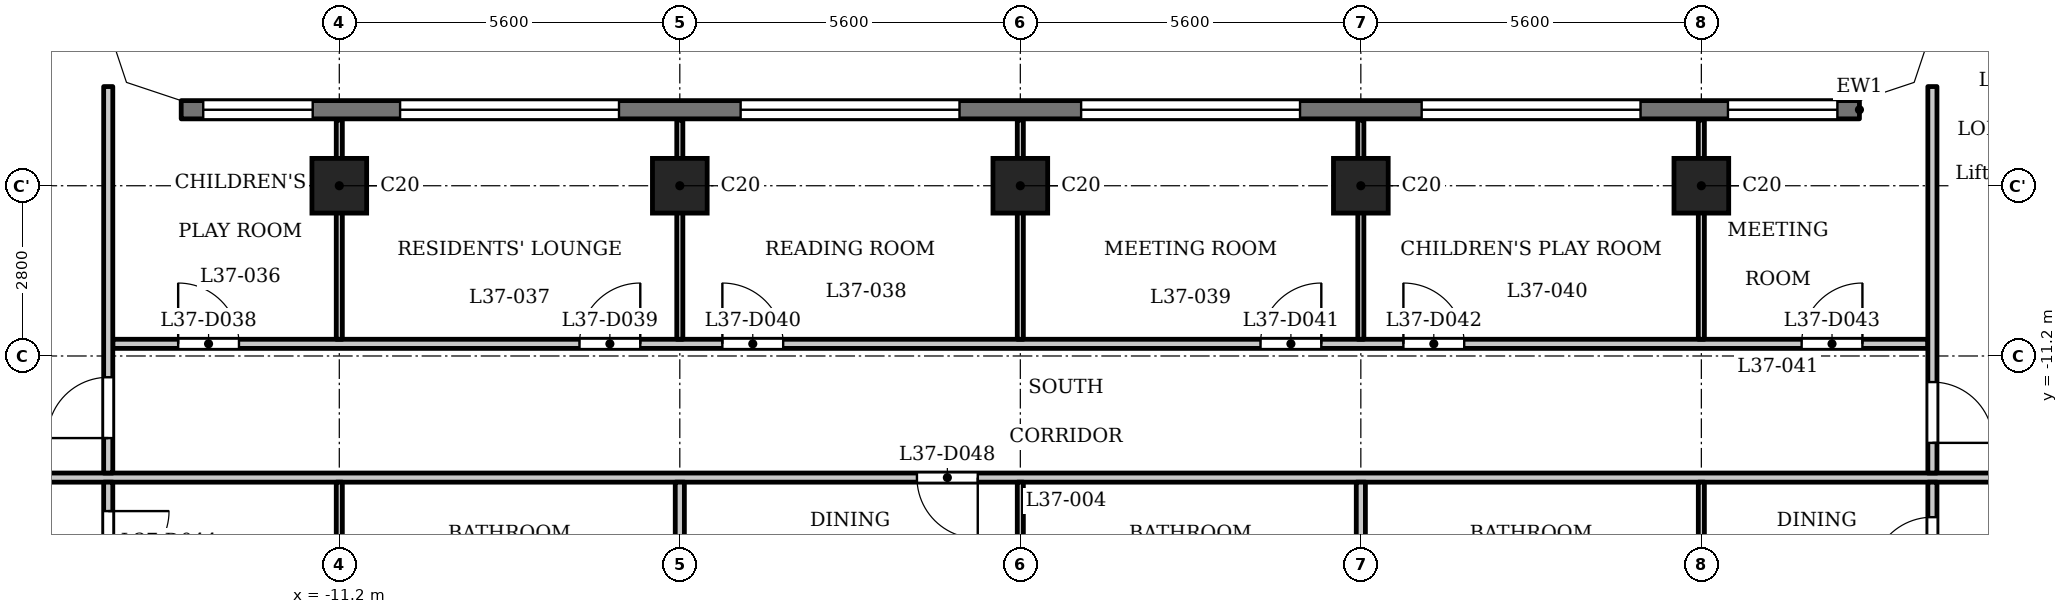
"""IFC4 building model, lengths in metres.
Left out: names, types, materials, properties, quantities, classifications, styles, units other than length and angle.
Written with IfcOpenShell. Run it as: python <this file> out.ifc"""

import sys

from ifc_helpers import new_model, si_unit, direction, frame, frame_2d, origin, origin_2d, place, context, subcontext, project, spatial, polyline, rectangle, outline, extrude, element, fill, save


model = new_model("IFC4")
c1 = context("Model", 3, precision=1e-05, world=origin(), true_north=direction((0.0, 1.0)))
c2 = subcontext(c1, "Body", "Model", "MODEL_VIEW")
j1 = project(units=[si_unit("LENGTHUNIT", "METRE"), si_unit("PLANEANGLEUNIT", "RADIAN")], contexts=[c1])
p1 = place(None, origin())
s1 = spatial("IfcSite", under=j1, at=p1, CompositionType="ELEMENT")
p2 = place(p1, origin())
s2 = spatial("IfcBuilding", under=s1, at=p2, CompositionType="ELEMENT")
p3 = place(p2, frame((0.0, 0.0, 146.6)))
s3 = spatial("IfcBuildingStorey", under=s2, at=p3, CompositionType="ELEMENT", Elevation=146.6)
for number, where, z_axis, x_axis in (
    (1, (-11.2, -8.4, 0.0), (0.0, 0.0, 1.0), (1.0, 0.0, 0.0)),
    (2, (-5.6, -8.4, 0.0), (0.0, 0.0, 1.0), (1.0, 0.0, 0.0)),
    (3, (0.0, -8.4, 0.0), (0.0, 0.0, 1.0), (1.0, 0.0, 0.0)),
    (4, (5.6, -8.4, 0.0), (0.0, 0.0, 1.0), (1.0, 0.0, 0.0)),
    (5, (11.2, -8.4, 0.0), (0.0, 0.0, 1.0), (1.0, 0.0, 0.0)),
):
    element("IfcColumn", number, at=place(p3, frame(where, z_axis=z_axis, x_axis=x_axis)), inside=s3, PredefinedType="COLUMN", context=c2, shape_type="SweptSolid", body=[
        extrude(rectangle(XDim=0.9, YDim=0.9, at=origin_2d()), origin(), (0.0, 0.0, 1.0), 3.5),
    ])
p4 = place(p3, frame((13.8, -7.15, 0.0), z_axis=(0.0, 0.0, 1.0), x_axis=(-1.0, 0.0, 0.0)))
e6 = element("IfcWall", 6, at=p4, inside=s3, PredefinedType="SOLIDWALL", context=c2, shape_type="SweptSolid", body=[
    extrude(rectangle(XDim=27.6, YDim=0.3, at=frame_2d((13.8, 0.0))), origin(), (0.0, 0.0, 1.0), 3.2),
])
p5 = place(p4, frame((0.363, 0.0, 0.9)))
e7 = element("IfcOpeningElement", 7, at=p5, cuts=e6, PredefinedType="OPENING", context=c2, shape_type="SweptSolid", body=[
    extrude(rectangle(XDim=1.8, YDim=1.25, at=frame_2d((0.9, 0.625))), frame((0.0, 0.16, 0.0), z_axis=(0.0, -1.0, 0.0), x_axis=(1.0, 0.0, 0.0)), (0.0, 0.0, 1.0), 0.32),
])
p6 = place(p4, frame((3.6, 0.0, 1.2)))
e8 = element("IfcOpeningElement", 8, at=p6, cuts=e6, PredefinedType="OPENING", context=c2, shape_type="SweptSolid", body=[
    extrude(rectangle(XDim=3.6, YDim=0.95, at=frame_2d((1.8, 0.475))), frame((0.0, 0.16, 0.0), z_axis=(0.0, -1.0, 0.0), x_axis=(1.0, 0.0, 0.0)), (0.0, 0.0, 1.0), 0.32),
])
p7 = place(p4, frame((9.2, 0.0, 1.2)))
e9 = element("IfcOpeningElement", 9, at=p7, cuts=e6, PredefinedType="OPENING", context=c2, shape_type="SweptSolid", body=[
    extrude(rectangle(XDim=3.6, YDim=0.95, at=frame_2d((1.8, 0.475))), frame((0.0, 0.16, 0.0), z_axis=(0.0, -1.0, 0.0), x_axis=(1.0, 0.0, 0.0)), (0.0, 0.0, 1.0), 0.32),
])
p8 = place(p4, frame((14.8, 0.0, 1.2)))
e10 = element("IfcOpeningElement", 10, at=p8, cuts=e6, PredefinedType="OPENING", context=c2, shape_type="SweptSolid", body=[
    extrude(rectangle(XDim=3.6, YDim=0.95, at=frame_2d((1.8, 0.475))), frame((0.0, 0.16, 0.0), z_axis=(0.0, -1.0, 0.0), x_axis=(1.0, 0.0, 0.0)), (0.0, 0.0, 1.0), 0.32),
])
p9 = place(p4, frame((20.4, 0.0, 1.2)))
e11 = element("IfcOpeningElement", 11, at=p9, cuts=e6, PredefinedType="OPENING", context=c2, shape_type="SweptSolid", body=[
    extrude(rectangle(XDim=3.6, YDim=0.95, at=frame_2d((1.8, 0.475))), frame((0.0, 0.16, 0.0), z_axis=(0.0, -1.0, 0.0), x_axis=(1.0, 0.0, 0.0)), (0.0, 0.0, 1.0), 0.32),
])
p10 = place(p4, frame((25.438, 0.0, 0.9)))
e12 = element("IfcOpeningElement", 12, at=p10, cuts=e6, PredefinedType="OPENING", context=c2, shape_type="SweptSolid", body=[
    extrude(rectangle(XDim=1.8, YDim=1.25, at=frame_2d((0.9, 0.625))), frame((0.0, 0.16, 0.0), z_axis=(0.0, -1.0, 0.0), x_axis=(1.0, 0.0, 0.0)), (0.0, 0.0, 1.0), 0.32),
])
p11 = place(p3, frame((-17.4, -13.2, 0.0), z_axis=(0.0, 0.0, 1.0), x_axis=(1.0, 0.0, 0.0)))
e13 = element("IfcWall", 13, at=p11, inside=s3, PredefinedType="PARTITIONING", context=c2, shape_type="SweptSolid", body=[
    extrude(rectangle(XDim=34.8, YDim=0.15, at=frame_2d((17.4, 0.0))), origin(), (0.0, 0.0, 1.0), 3.2),
])
p12 = place(p11, frame((0.15, 0.0, 0.0)))
e14 = element("IfcOpeningElement", 14, at=p12, cuts=e13, PredefinedType="OPENING", context=c2, shape_type="SweptSolid", body=[
    extrude(rectangle(XDim=1.0, YDim=2.1, at=frame_2d((0.5, 1.05))), frame((0.0, 0.085, 0.0), z_axis=(0.0, -1.0, 0.0), x_axis=(1.0, 0.0, 0.0)), (0.0, 0.0, 1.0), 0.17),
])
p13 = place(p11, frame((33.55, 0.0, 0.0)))
e15 = element("IfcOpeningElement", 15, at=p13, cuts=e13, PredefinedType="OPENING", context=c2, shape_type="SweptSolid", body=[
    extrude(rectangle(XDim=1.0, YDim=2.1, at=frame_2d((0.5, 1.05))), frame((0.0, 0.085, 0.0), z_axis=(0.0, -1.0, 0.0), x_axis=(1.0, 0.0, 0.0)), (0.0, 0.0, 1.0), 0.17),
])
p14 = place(p11, frame((15.7, 0.0, 0.0)))
e16 = element("IfcOpeningElement", 16, at=p14, cuts=e13, PredefinedType="OPENING", context=c2, shape_type="SweptSolid", body=[
    extrude(rectangle(XDim=1.0, YDim=2.1, at=frame_2d((0.5, 1.05))), frame((0.0, 0.085, 0.0), z_axis=(0.0, -1.0, 0.0), x_axis=(1.0, 0.0, 0.0)), (0.0, 0.0, 1.0), 0.17),
])
p15 = place(p3, frame((-14.925, -11.0, 0.0), z_axis=(0.0, 0.0, 1.0), x_axis=(1.0, 0.0, 0.0)))
e17 = element("IfcWall", 17, at=p15, inside=s3, PredefinedType="PARTITIONING", context=c2, shape_type="SweptSolid", body=[
    extrude(rectangle(XDim=29.85, YDim=0.15, at=frame_2d((14.925, 0.0))), origin(), (0.0, 0.0, 1.0), 3.2),
])
p16 = place(p15, frame((1.075, 0.0, 0.0)))
e18 = element("IfcOpeningElement", 18, at=p16, cuts=e17, PredefinedType="OPENING", context=c2, shape_type="SweptSolid", body=[
    extrude(rectangle(XDim=1.0, YDim=2.1, at=frame_2d((0.5, 1.05))), frame((0.0, 0.085, 0.0), z_axis=(0.0, -1.0, 0.0), x_axis=(1.0, 0.0, 0.0)), (0.0, 0.0, 1.0), 0.17),
])
p17 = place(p15, frame((7.675, 0.0, 0.0)))
e19 = element("IfcOpeningElement", 19, at=p17, cuts=e17, PredefinedType="OPENING", context=c2, shape_type="SweptSolid", body=[
    extrude(rectangle(XDim=1.0, YDim=2.1, at=frame_2d((0.5, 1.05))), frame((0.0, 0.085, 0.0), z_axis=(0.0, -1.0, 0.0), x_axis=(1.0, 0.0, 0.0)), (0.0, 0.0, 1.0), 0.17),
])
p18 = place(p15, frame((10.025, 0.0, 0.0)))
e20 = element("IfcOpeningElement", 20, at=p18, cuts=e17, PredefinedType="OPENING", context=c2, shape_type="SweptSolid", body=[
    extrude(rectangle(XDim=1.0, YDim=2.1, at=frame_2d((0.5, 1.05))), frame((0.0, 0.085, 0.0), z_axis=(0.0, -1.0, 0.0), x_axis=(1.0, 0.0, 0.0)), (0.0, 0.0, 1.0), 0.17),
])
p19 = place(p15, frame((18.875, 0.0, 0.0)))
e21 = element("IfcOpeningElement", 21, at=p19, cuts=e17, PredefinedType="OPENING", context=c2, shape_type="SweptSolid", body=[
    extrude(rectangle(XDim=1.0, YDim=2.1, at=frame_2d((0.5, 1.05))), frame((0.0, 0.085, 0.0), z_axis=(0.0, -1.0, 0.0), x_axis=(1.0, 0.0, 0.0)), (0.0, 0.0, 1.0), 0.17),
])
p20 = place(p15, frame((21.225, 0.0, 0.0)))
e22 = element("IfcOpeningElement", 22, at=p20, cuts=e17, PredefinedType="OPENING", context=c2, shape_type="SweptSolid", body=[
    extrude(rectangle(XDim=1.0, YDim=2.1, at=frame_2d((0.5, 1.05))), frame((0.0, 0.085, 0.0), z_axis=(0.0, -1.0, 0.0), x_axis=(1.0, 0.0, 0.0)), (0.0, 0.0, 1.0), 0.17),
])
p21 = place(p15, frame((27.774, 0.0, 0.0)))
e23 = element("IfcOpeningElement", 23, at=p21, cuts=e17, PredefinedType="OPENING", context=c2, shape_type="SweptSolid", body=[
    extrude(rectangle(XDim=1.0, YDim=2.1, at=frame_2d((0.5, 1.05))), frame((0.0, 0.085, 0.0), z_axis=(0.0, -1.0, 0.0), x_axis=(1.0, 0.0, 0.0)), (0.0, 0.0, 1.0), 0.17),
])
p22 = place(p3, frame((-15.0, -15.325, 0.0), z_axis=(0.0, 0.0, 1.0), x_axis=(0.0, 1.0, 0.0)))
e24 = element("IfcWall", 24, at=p22, inside=s3, PredefinedType="PARTITIONING", context=c2, shape_type="SweptSolid", body=[
    extrude(rectangle(XDim=2.05, YDim=0.15, at=frame_2d((1.025, 0.0))), origin(), (0.0, 0.0, 1.0), 3.2),
])
p23 = place(p22, frame((0.574, 0.0, 0.0)))
e25 = element("IfcOpeningElement", 25, at=p23, cuts=e24, PredefinedType="OPENING", context=c2, shape_type="SweptSolid", body=[
    extrude(rectangle(XDim=1.0, YDim=2.1, at=frame_2d((0.5, 1.05))), frame((0.0, 0.085, 0.0), z_axis=(0.0, -1.0, 0.0), x_axis=(1.0, 0.0, 0.0)), (0.0, 0.0, 1.0), 0.17),
])
p24 = place(p3, frame((-15.0, -13.125, 0.0), z_axis=(0.0, 0.0, 1.0), x_axis=(0.0, 1.0, 0.0)))
e26 = element("IfcWall", 26, at=p24, inside=s3, PredefinedType="PARTITIONING", context=c2, shape_type="SweptSolid", body=[
    extrude(rectangle(XDim=6.356, YDim=0.15, at=frame_2d((3.178, 0.0))), origin(), (0.0, 0.0, 1.0), 3.2),
])
p25 = place(p24, frame((0.575, 0.0, 0.0)))
e27 = element("IfcOpeningElement", 27, at=p25, cuts=e26, PredefinedType="OPENING", context=c2, shape_type="SweptSolid", body=[
    extrude(rectangle(XDim=1.0, YDim=2.1, at=frame_2d((0.5, 1.05))), frame((0.0, 0.085, 0.0), z_axis=(0.0, -1.0, 0.0), x_axis=(1.0, 0.0, 0.0)), (0.0, 0.0, 1.0), 0.17),
])
p26 = place(p3, frame((-11.2, -16.45, 0.0), z_axis=(0.0, 0.0, 1.0), x_axis=(0.0, 1.0, 0.0)))
e28 = element("IfcWall", 28, at=p26, inside=s3, PredefinedType="PARTITIONING", context=c2, shape_type="SweptSolid", body=[
    extrude(rectangle(XDim=3.175, YDim=0.1, at=frame_2d((1.587, 0.0))), origin(), (0.0, 0.0, 1.0), 3.2),
])
for number, where, z_axis, x_axis in (
    (29, (-11.2, -10.925, 0.0), (0.0, 0.0, 1.0), (0.0, 1.0, 0.0)),
    (30, (-5.6, -10.925, 0.0), (0.0, 0.0, 1.0), (0.0, 1.0, 0.0)),
):
    element("IfcWall", number, at=place(p3, frame(where, z_axis=z_axis, x_axis=x_axis)), inside=s3, PredefinedType="PARTITIONING", context=c2, shape_type="SweptSolid", body=[
        extrude(rectangle(XDim=3.605, YDim=0.1, at=frame_2d((1.802, 0.0))), origin(), (0.0, 0.0, 1.0), 3.2),
    ])
p27 = place(p3, frame((-5.6, -16.45, 0.0), z_axis=(0.0, 0.0, 1.0), x_axis=(0.0, 1.0, 0.0)))
e31 = element("IfcWall", 31, at=p27, inside=s3, PredefinedType="PARTITIONING", context=c2, shape_type="SweptSolid", body=[
    extrude(rectangle(XDim=3.175, YDim=0.15, at=frame_2d((1.587, 0.0))), origin(), (0.0, 0.0, 1.0), 3.2),
])
p28 = place(p3, frame((0.0, -16.45, 0.0), z_axis=(0.0, 0.0, 1.0), x_axis=(0.0, 1.0, 0.0)))
e32 = element("IfcWall", 32, at=p28, inside=s3, PredefinedType="PARTITIONING", context=c2, shape_type="SweptSolid", body=[
    extrude(rectangle(XDim=3.175, YDim=0.1, at=frame_2d((1.587, 0.0))), origin(), (0.0, 0.0, 1.0), 3.2),
])
for number, where, z_axis, x_axis in (
    (33, (0.0, -10.925, 0.0), (0.0, 0.0, 1.0), (0.0, 1.0, 0.0)),
    (34, (5.6, -10.925, 0.0), (0.0, 0.0, 1.0), (0.0, 1.0, 0.0)),
):
    element("IfcWall", number, at=place(p3, frame(where, z_axis=z_axis, x_axis=x_axis)), inside=s3, PredefinedType="PARTITIONING", context=c2, shape_type="SweptSolid", body=[
        extrude(rectangle(XDim=3.605, YDim=0.1, at=frame_2d((1.802, 0.0))), origin(), (0.0, 0.0, 1.0), 3.2),
    ])
p29 = place(p3, frame((5.6, -16.45, 0.0), z_axis=(0.0, 0.0, 1.0), x_axis=(0.0, 1.0, 0.0)))
e35 = element("IfcWall", 35, at=p29, inside=s3, PredefinedType="PARTITIONING", context=c2, shape_type="SweptSolid", body=[
    extrude(rectangle(XDim=3.175, YDim=0.15, at=frame_2d((1.587, 0.0))), origin(), (0.0, 0.0, 1.0), 3.2),
])
p30 = place(p3, frame((11.2, -16.45, 0.0), z_axis=(0.0, 0.0, 1.0), x_axis=(0.0, 1.0, 0.0)))
e36 = element("IfcWall", 36, at=p30, inside=s3, PredefinedType="PARTITIONING", context=c2, shape_type="SweptSolid", body=[
    extrude(rectangle(XDim=3.175, YDim=0.1, at=frame_2d((1.587, 0.0))), origin(), (0.0, 0.0, 1.0), 3.2),
])
p31 = place(p3, frame((11.2, -10.925, 0.0), z_axis=(0.0, 0.0, 1.0), x_axis=(0.0, 1.0, 0.0)))
e37 = element("IfcWall", 37, at=p31, inside=s3, PredefinedType="PARTITIONING", context=c2, shape_type="SweptSolid", body=[
    extrude(rectangle(XDim=3.605, YDim=0.1, at=frame_2d((1.802, 0.0))), origin(), (0.0, 0.0, 1.0), 3.2),
])
p32 = place(p3, frame((15.0, -15.325, 0.0), z_axis=(0.0, 0.0, 1.0), x_axis=(0.0, 1.0, 0.0)))
e38 = element("IfcWall", 38, at=p32, inside=s3, PredefinedType="PARTITIONING", context=c2, shape_type="SweptSolid", body=[
    extrude(rectangle(XDim=2.05, YDim=0.15, at=frame_2d((1.025, 0.0))), origin(), (0.0, 0.0, 1.0), 3.2),
])
p33 = place(p32, frame((0.474, 0.0, 0.0)))
e39 = element("IfcOpeningElement", 39, at=p33, cuts=e38, PredefinedType="OPENING", context=c2, shape_type="SweptSolid", body=[
    extrude(rectangle(XDim=1.0, YDim=2.1, at=frame_2d((0.5, 1.05))), frame((0.0, 0.085, 0.0), z_axis=(0.0, -1.0, 0.0), x_axis=(1.0, 0.0, 0.0)), (0.0, 0.0, 1.0), 0.17),
])
p34 = place(p3, frame((15.0, -13.125, 0.0), z_axis=(0.0, 0.0, 1.0), x_axis=(0.0, 1.0, 0.0)))
e40 = element("IfcWall", 40, at=p34, inside=s3, PredefinedType="PARTITIONING", context=c2, shape_type="SweptSolid", body=[
    extrude(rectangle(XDim=6.356, YDim=0.15, at=frame_2d((3.178, 0.0))), origin(), (0.0, 0.0, 1.0), 3.2),
])
p35 = place(p34, frame((0.496, 0.0, 0.0)))
e41 = element("IfcOpeningElement", 41, at=p35, cuts=e40, PredefinedType="OPENING", context=c2, shape_type="SweptSolid", body=[
    extrude(rectangle(XDim=1.0, YDim=2.1, at=frame_2d((0.5, 1.05))), frame((0.0, 0.085, 0.0), z_axis=(0.0, -1.0, 0.0), x_axis=(1.0, 0.0, 0.0)), (0.0, 0.0, 1.0), 0.17),
])
p36 = place(p3, origin())
e42 = element("IfcWall", 42, at=p36, inside=s3, PredefinedType="SOLIDWALL", context=c2, shape_type="SweptSolid", body=[
    extrude(outline(polyline([(14.937, -6.937), (15.3, -5.849), (15.3, -5.8), (15.0, -5.8), (14.7, -6.7), (13.8, -7.0), (13.8, -7.3), (13.849, -7.3), (14.937, -6.937)])), origin(), (0.0, 0.0, 1.0), 3.2),
])
e43 = element("IfcWall", 43, at=p36, inside=s3, PredefinedType="SOLIDWALL", context=c2, shape_type="SweptSolid", body=[
    extrude(outline(polyline([(-14.937, -6.937), (-13.849, -7.3), (-13.8, -7.3), (-13.8, -7.0), (-14.7, -6.7), (-15.0, -5.8), (-15.3, -5.8), (-15.3, -5.849), (-14.937, -6.937)])), origin(), (0.0, 0.0, 1.0), 3.2),
])
p37 = place(p25, origin())
e44 = element("IfcDoor", 44, at=p37, inside=s3, OperationType="SINGLE_SWING_RIGHT", PredefinedType="DOOR", context=c2, shape_type="SweptSolid", body=[
    extrude(rectangle(XDim=1.0, YDim=2.1, at=frame_2d((0.5, 1.05))), frame((0.0, 0.025, 0.0), z_axis=(0.0, -1.0, 0.0), x_axis=(1.0, 0.0, 0.0)), (0.0, 0.0, 1.0), 0.05),
])
fill(e27, e44)
p38 = place(p35, origin())
e45 = element("IfcDoor", 45, at=p38, inside=s3, OperationType="SINGLE_SWING_LEFT", PredefinedType="DOOR", context=c2, shape_type="SweptSolid", body=[
    extrude(rectangle(XDim=1.0, YDim=2.1, at=frame_2d((0.5, 1.05))), frame((0.0, 0.025, 0.0), z_axis=(0.0, -1.0, 0.0), x_axis=(1.0, 0.0, 0.0)), (0.0, 0.0, 1.0), 0.05),
])
fill(e41, e45)
p39 = place(p16, origin())
e46 = element("IfcDoor", 46, at=p39, inside=s3, OperationType="SINGLE_SWING_RIGHT", PredefinedType="DOOR", context=c2, shape_type="SweptSolid", body=[
    extrude(rectangle(XDim=1.0, YDim=2.1, at=frame_2d((0.5, 1.05))), frame((0.0, 0.025, 0.0), z_axis=(0.0, -1.0, 0.0), x_axis=(1.0, 0.0, 0.0)), (0.0, 0.0, 1.0), 0.05),
])
fill(e18, e46)
p40 = place(p17, origin())
e47 = element("IfcDoor", 47, at=p40, inside=s3, OperationType="SINGLE_SWING_LEFT", PredefinedType="DOOR", context=c2, shape_type="SweptSolid", body=[
    extrude(rectangle(XDim=1.0, YDim=2.1, at=frame_2d((0.5, 1.05))), frame((0.0, 0.025, 0.0), z_axis=(0.0, -1.0, 0.0), x_axis=(1.0, 0.0, 0.0)), (0.0, 0.0, 1.0), 0.05),
])
fill(e19, e47)
p41 = place(p18, origin())
e48 = element("IfcDoor", 48, at=p41, inside=s3, OperationType="SINGLE_SWING_RIGHT", PredefinedType="DOOR", context=c2, shape_type="SweptSolid", body=[
    extrude(rectangle(XDim=1.0, YDim=2.1, at=frame_2d((0.5, 1.05))), frame((0.0, 0.025, 0.0), z_axis=(0.0, -1.0, 0.0), x_axis=(1.0, 0.0, 0.0)), (0.0, 0.0, 1.0), 0.05),
])
fill(e20, e48)
p42 = place(p19, origin())
e49 = element("IfcDoor", 49, at=p42, inside=s3, OperationType="SINGLE_SWING_LEFT", PredefinedType="DOOR", context=c2, shape_type="SweptSolid", body=[
    extrude(rectangle(XDim=1.0, YDim=2.1, at=frame_2d((0.5, 1.05))), frame((0.0, 0.025, 0.0), z_axis=(0.0, -1.0, 0.0), x_axis=(1.0, 0.0, 0.0)), (0.0, 0.0, 1.0), 0.05),
])
fill(e21, e49)
p43 = place(p20, origin())
e50 = element("IfcDoor", 50, at=p43, inside=s3, OperationType="SINGLE_SWING_RIGHT", PredefinedType="DOOR", context=c2, shape_type="SweptSolid", body=[
    extrude(rectangle(XDim=1.0, YDim=2.1, at=frame_2d((0.5, 1.05))), frame((0.0, 0.025, 0.0), z_axis=(0.0, -1.0, 0.0), x_axis=(1.0, 0.0, 0.0)), (0.0, 0.0, 1.0), 0.05),
])
fill(e22, e50)
p44 = place(p21, origin())
e51 = element("IfcDoor", 51, at=p44, inside=s3, OperationType="SINGLE_SWING_LEFT", PredefinedType="DOOR", context=c2, shape_type="SweptSolid", body=[
    extrude(rectangle(XDim=1.0, YDim=2.1, at=frame_2d((0.5, 1.05))), frame((0.0, 0.025, 0.0), z_axis=(0.0, -1.0, 0.0), x_axis=(1.0, 0.0, 0.0)), (0.0, 0.0, 1.0), 0.05),
])
fill(e23, e51)
p45 = place(p23, origin())
e52 = element("IfcDoor", 52, at=p45, inside=s3, OperationType="SINGLE_SWING_RIGHT", PredefinedType="DOOR", context=c2, shape_type="SweptSolid", body=[
    extrude(rectangle(XDim=1.0, YDim=2.1, at=frame_2d((0.5, 1.05))), frame((0.0, 0.025, 0.0), z_axis=(0.0, -1.0, 0.0), x_axis=(1.0, 0.0, 0.0)), (0.0, 0.0, 1.0), 0.05),
])
fill(e25, e52)
p46 = place(p14, origin())
e53 = element("IfcDoor", 53, at=p46, inside=s3, OperationType="SINGLE_SWING_RIGHT", PredefinedType="DOOR", context=c2, shape_type="SweptSolid", body=[
    extrude(rectangle(XDim=1.0, YDim=2.1, at=frame_2d((0.5, 1.05))), frame((0.0, 0.025, 0.0), z_axis=(0.0, -1.0, 0.0), x_axis=(1.0, 0.0, 0.0)), (0.0, 0.0, 1.0), 0.05),
])
fill(e16, e53)
p47 = place(p33, origin())
e54 = element("IfcDoor", 54, at=p47, inside=s3, OperationType="SINGLE_SWING_RIGHT", PredefinedType="DOOR", context=c2, shape_type="SweptSolid", body=[
    extrude(rectangle(XDim=1.0, YDim=2.1, at=frame_2d((0.5, 1.05))), frame((0.0, 0.025, 0.0), z_axis=(0.0, -1.0, 0.0), x_axis=(1.0, 0.0, 0.0)), (0.0, 0.0, 1.0), 0.05),
])
fill(e39, e54)
p48 = place(p5, origin())
e55 = element("IfcWindow", 55, at=p48, inside=s3, PartitioningType="SINGLE_PANEL", PredefinedType="WINDOW", context=c2, shape_type="SweptSolid", body=[
    extrude(rectangle(XDim=1.8, YDim=1.25, at=frame_2d((0.9, 0.625))), frame((0.0, 0.03, 0.0), z_axis=(0.0, -1.0, 0.0), x_axis=(1.0, 0.0, 0.0)), (0.0, 0.0, 1.0), 0.06),
])
fill(e7, e55)
p49 = place(p6, origin())
e56 = element("IfcWindow", 56, at=p49, inside=s3, PartitioningType="SINGLE_PANEL", PredefinedType="WINDOW", context=c2, shape_type="SweptSolid", body=[
    extrude(rectangle(XDim=3.6, YDim=0.95, at=frame_2d((1.8, 0.475))), frame((0.0, 0.03, 0.0), z_axis=(0.0, -1.0, 0.0), x_axis=(1.0, 0.0, 0.0)), (0.0, 0.0, 1.0), 0.06),
])
fill(e8, e56)
p50 = place(p7, origin())
e57 = element("IfcWindow", 57, at=p50, inside=s3, PartitioningType="SINGLE_PANEL", PredefinedType="WINDOW", context=c2, shape_type="SweptSolid", body=[
    extrude(rectangle(XDim=3.6, YDim=0.95, at=frame_2d((1.8, 0.475))), frame((0.0, 0.03, 0.0), z_axis=(0.0, -1.0, 0.0), x_axis=(1.0, 0.0, 0.0)), (0.0, 0.0, 1.0), 0.06),
])
fill(e9, e57)
p51 = place(p8, origin())
e58 = element("IfcWindow", 58, at=p51, inside=s3, PartitioningType="SINGLE_PANEL", PredefinedType="WINDOW", context=c2, shape_type="SweptSolid", body=[
    extrude(rectangle(XDim=3.6, YDim=0.95, at=frame_2d((1.8, 0.475))), frame((0.0, 0.03, 0.0), z_axis=(0.0, -1.0, 0.0), x_axis=(1.0, 0.0, 0.0)), (0.0, 0.0, 1.0), 0.06),
])
fill(e10, e58)
p52 = place(p9, origin())
e59 = element("IfcWindow", 59, at=p52, inside=s3, PartitioningType="SINGLE_PANEL", PredefinedType="WINDOW", context=c2, shape_type="SweptSolid", body=[
    extrude(rectangle(XDim=3.6, YDim=0.95, at=frame_2d((1.8, 0.475))), frame((0.0, 0.03, 0.0), z_axis=(0.0, -1.0, 0.0), x_axis=(1.0, 0.0, 0.0)), (0.0, 0.0, 1.0), 0.06),
])
fill(e11, e59)
p53 = place(p10, origin())
e60 = element("IfcWindow", 60, at=p53, inside=s3, PartitioningType="SINGLE_PANEL", PredefinedType="WINDOW", context=c2, shape_type="SweptSolid", body=[
    extrude(rectangle(XDim=1.8, YDim=1.25, at=frame_2d((0.9, 0.625))), frame((0.0, 0.03, 0.0), z_axis=(0.0, -1.0, 0.0), x_axis=(1.0, 0.0, 0.0)), (0.0, 0.0, 1.0), 0.06),
])
fill(e12, e60)
save(model, sys.argv[1])
